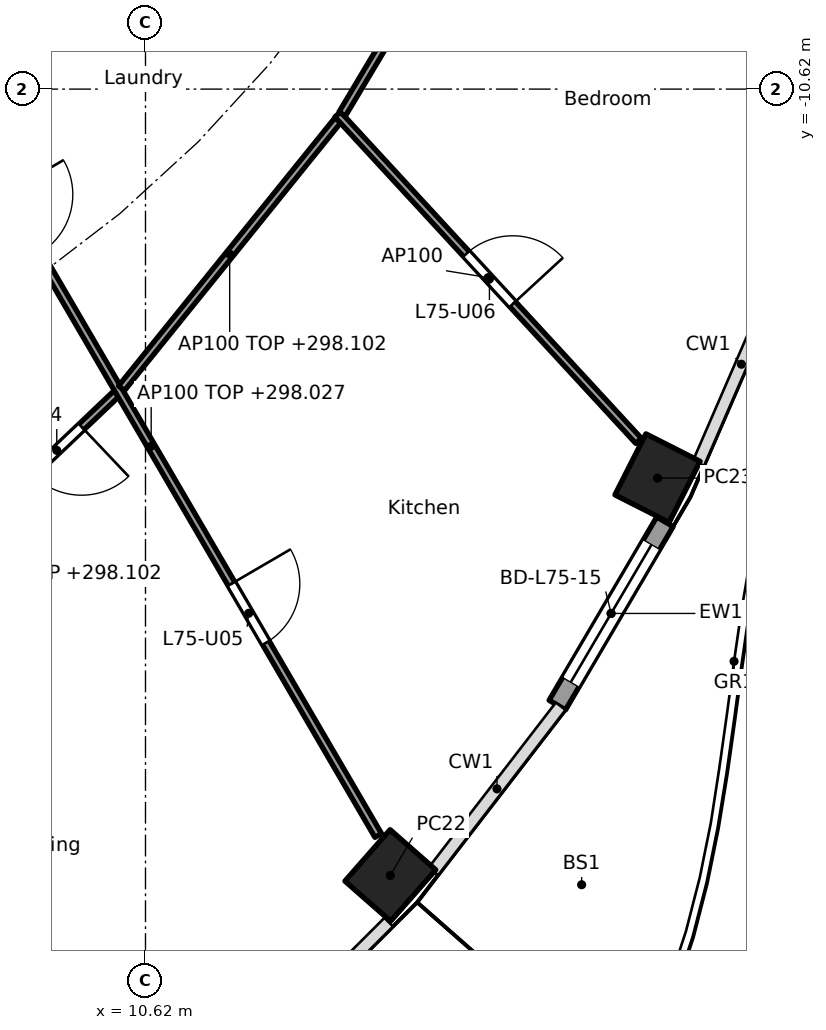
"""IFC4 building model, lengths in metres.
Left out: names, types, materials, properties, quantities, classifications, styles, units other than length and angle.
Written with IfcOpenShell. Run it as: python <this file> out.ifc"""

import sys

from ifc_helpers import new_model, si_unit, direction, frame, frame_2d, origin, origin_2d, place, context, subcontext, project, spatial, rectangle, hollow_rectangle, extrude, element, fill, save


model = new_model("IFC4")
c1 = context("Model", 3, precision=1e-05, world=origin(), true_north=direction((0.0, 1.0)))
c2 = subcontext(c1, "Body", "Model", "MODEL_VIEW")
j1 = project(units=[si_unit("LENGTHUNIT", "METRE"), si_unit("PLANEANGLEUNIT", "RADIAN")], contexts=[c1])
p1 = place(None, origin())
s1 = spatial("IfcSite", under=j1, at=p1, CompositionType="ELEMENT")
p2 = place(p1, origin())
s2 = spatial("IfcBuilding", under=s1, at=p2, CompositionType="ELEMENT")
p3 = place(p2, frame((0.0, 0.0, 295.5)))
s3 = spatial("IfcBuildingStorey", under=s2, at=p3, CompositionType="ELEMENT", Elevation=295.5)
for number, where, z_axis, x_axis in (
    (1, (13.841, -20.965, 0.0), (0.0, 0.0, 1.0), (0.66, 0.751, 0.0)),
    (2, (17.356, -15.738, 0.0), (0.0, 0.0, 1.0), (0.452, 0.892, 0.0)),
):
    element("IfcColumn", number, at=place(p3, frame(where, z_axis=z_axis, x_axis=x_axis)), inside=s3, PredefinedType="COLUMN", context=c2, shape_type="SweptSolid", body=[
        extrude(hollow_rectangle(XDim=0.9, YDim=0.8, WallThickness=0.028, at=origin_2d()), origin(), (0.0, 0.0, 1.0), 3.7),
    ])
p4 = place(p3, frame((17.454, -16.312, 0.0), z_axis=(0.0, 0.0, 1.0), x_axis=(-0.506371364425, -0.862315511452, 0.0)))
e3 = element("IfcWall", 3, at=p4, inside=s3, PredefinedType="SOLIDWALL", context=c2, shape_type="SweptSolid", body=[
    extrude(rectangle(XDim=2.796, YDim=0.25, at=frame_2d((1.398, 0.0))), origin(), (0.0, 0.0, 1.0), 3.28),
])
p5 = place(p4, frame((0.348, 0.0, 0.0)))
e4 = element("IfcOpeningElement", 4, at=p5, cuts=e3, PredefinedType="OPENING", context=c2, shape_type="SweptSolid", body=[
    extrude(rectangle(XDim=2.1, YDim=2.4, at=frame_2d((1.05, 1.2))), frame((0.0, 0.135, 0.0), z_axis=(0.0, -1.0, 0.0), x_axis=(1.0, 0.0, 0.0)), (0.0, 0.0, 1.0), 0.27),
])
p6 = place(p3, frame((4.613, -9.988, 0.0), z_axis=(0.0, 0.0, 1.0), x_axis=(0.707106781187, 0.707106781187, 0.0)))
e5 = element("IfcWall", 5, at=p6, inside=s3, PredefinedType="SHEAR", context=c2, shape_type="SweptSolid", body=[
    extrude(rectangle(XDim=7.602, YDim=0.6, at=frame_2d((3.801, 0.0))), origin(), (0.0, 0.0, 1.0), 3.28),
])
p7 = place(p6, frame((3.201, 0.0, 0.0)))
e6 = element("IfcOpeningElement", 6, at=p7, cuts=e5, PredefinedType="OPENING", context=c2, shape_type="SweptSolid", body=[
    extrude(rectangle(XDim=1.2, YDim=2.1, at=frame_2d((0.6, 1.05))), frame((0.0, 0.31, 0.0), z_axis=(0.0, -1.0, 0.0), x_axis=(1.0, 0.0, 0.0)), (0.0, 0.0, 1.0), 0.62),
])
p8 = place(p3, frame((5.275, -12.494, 0.0), z_axis=(0.0, 0.0, 1.0), x_axis=(0.707106781187, 0.707106781187, 0.0)))
e7 = element("IfcWall", 7, at=p8, inside=s3, PredefinedType="PARTITIONING", context=c2, shape_type="SweptSolid", body=[
    extrude(rectangle(XDim=10.409, YDim=0.2, at=frame_2d((5.205, 0.0))), origin(), (0.0, 0.0, 1.0), 3.28),
])
p9 = place(p8, frame((1.185, 0.0, 0.0)))
e8 = element("IfcOpeningElement", 8, at=p9, cuts=e7, PredefinedType="OPENING", context=c2, shape_type="SweptSolid", body=[
    extrude(rectangle(XDim=1.0, YDim=2.1, at=frame_2d((0.5, 1.05))), frame((0.0, 0.11, 0.0), z_axis=(0.0, -1.0, 0.0), x_axis=(1.0, 0.0, 0.0)), (0.0, 0.0, 1.0), 0.22),
])
p10 = place(p3, frame((7.004, -17.695, 0.0), z_axis=(0.0, 0.0, 1.0), x_axis=(0.725438442765, 0.68828705186, 0.0)))
e9 = element("IfcWall", 9, at=p10, inside=s3, PredefinedType="PARTITIONING", context=c2, shape_type="SweptSolid", body=[
    extrude(rectangle(XDim=4.456, YDim=0.1, at=frame_2d((2.228, 0.0))), origin(), (0.0, 0.0, 1.0), 2.602),
])
p11 = place(p10, frame((2.925, 0.0, 0.0)))
e10 = element("IfcOpeningElement", 10, at=p11, cuts=e9, PredefinedType="OPENING", context=c2, shape_type="SweptSolid", body=[
    extrude(rectangle(XDim=0.9, YDim=2.1, at=frame_2d((0.45, 1.05))), frame((0.0, 0.06, 0.0), z_axis=(0.0, -1.0, 0.0), x_axis=(1.0, 0.0, 0.0)), (0.0, 0.0, 1.0), 0.12),
])
p12 = place(p3, frame((7.708, -10.198, 0.0), z_axis=(0.0, 0.0, 1.0), x_axis=(0.503839015963, -0.863797572347, 0.0)))
e11 = element("IfcWall", 11, at=p12, inside=s3, PredefinedType="PARTITIONING", context=c2, shape_type="SweptSolid", body=[
    extrude(rectangle(XDim=11.856, YDim=0.1, at=frame_2d((5.928, 0.0))), origin(), (0.0, 0.0, 1.0), 2.527),
])
p13 = place(p12, frame((2.095, 0.0, 0.0)))
e12 = element("IfcOpeningElement", 12, at=p13, cuts=e11, PredefinedType="OPENING", context=c2, shape_type="SweptSolid", body=[
    extrude(rectangle(XDim=0.9, YDim=2.1, at=frame_2d((0.45, 1.05))), frame((0.0, 0.06, 0.0), z_axis=(0.0, -1.0, 0.0), x_axis=(1.0, 0.0, 0.0)), (0.0, 0.0, 1.0), 0.12),
])
p14 = place(p12, frame((8.023, 0.0, 0.0)))
e13 = element("IfcOpeningElement", 13, at=p14, cuts=e11, PredefinedType="OPENING", context=c2, shape_type="SweptSolid", body=[
    extrude(rectangle(XDim=0.9, YDim=2.1, at=frame_2d((0.45, 1.05))), frame((0.0, 0.06, 0.0), z_axis=(0.0, -1.0, 0.0), x_axis=(1.0, 0.0, 0.0)), (0.0, 0.0, 1.0), 0.12),
])
p15 = place(p3, frame((10.304, -14.555, 0.0), z_axis=(0.0, 0.0, 1.0), x_axis=(0.628170338674, 0.778075848237, 0.0)))
e14 = element("IfcWall", 14, at=p15, inside=s3, PredefinedType="PARTITIONING", context=c2, shape_type="SweptSolid", body=[
    extrude(rectangle(XDim=4.532, YDim=0.1, at=frame_2d((2.266, 0.0))), origin(), (0.0, 0.0, 1.0), 2.602),
])
p16 = place(p3, frame((13.149, -10.953, 0.0), z_axis=(0.0, 0.0, 1.0), x_axis=(0.677762562884, -0.735280836384, 0.0)))
e15 = element("IfcWall", 15, at=p16, inside=s3, PredefinedType="PARTITIONING", context=c2, shape_type="SweptSolid", body=[
    extrude(rectangle(XDim=5.841, YDim=0.1, at=frame_2d((2.92, 0.0))), origin(), (0.0, 0.0, 1.0), 3.28),
])
p17 = place(p16, frame((2.495, 0.0, 0.0)))
e16 = element("IfcOpeningElement", 16, at=p17, cuts=e15, PredefinedType="OPENING", context=c2, shape_type="SweptSolid", body=[
    extrude(rectangle(XDim=0.9, YDim=2.1, at=frame_2d((0.45, 1.05))), frame((0.0, 0.06, 0.0), z_axis=(0.0, -1.0, 0.0), x_axis=(1.0, 0.0, 0.0)), (0.0, 0.0, 1.0), 0.12),
])
p18 = place(p3, frame((13.208, -10.947, 0.0), z_axis=(0.0, 0.0, 1.0), x_axis=(0.512726452516, 0.858552028063, 0.0)))
e17 = element("IfcWall", 17, at=p18, inside=s3, PredefinedType="PARTITIONING", context=c2, shape_type="SweptSolid", body=[
    extrude(rectangle(XDim=4.772, YDim=0.1, at=frame_2d((2.386, 0.0))), origin(), (0.0, 0.0, 1.0), 2.602),
])
p19 = place(p5, origin())
e18 = element("IfcDoor", 18, at=p19, inside=s3, OperationType="SLIDING_TO_LEFT", PredefinedType="DOOR", context=c2, shape_type="SweptSolid", body=[
    extrude(rectangle(XDim=2.1, YDim=2.4, at=frame_2d((1.05, 1.2))), frame((0.0, 0.025, 0.0), z_axis=(0.0, -1.0, 0.0), x_axis=(1.0, 0.0, 0.0)), (0.0, 0.0, 1.0), 0.05),
])
fill(e4, e18)
p20 = place(p11, frame((0.9, 0.0, 0.0), x_axis=(-1.0, 0.0, 0.0)))
e19 = element("IfcDoor", 19, at=p20, inside=s3, OperationType="SINGLE_SWING_LEFT", PredefinedType="DOOR", context=c2, shape_type="SweptSolid", body=[
    extrude(rectangle(XDim=0.9, YDim=2.1, at=frame_2d((0.45, 1.05))), frame((0.0, 0.025, 0.0), z_axis=(0.0, -1.0, 0.0), x_axis=(1.0, 0.0, 0.0)), (0.0, 0.0, 1.0), 0.05),
])
fill(e10, e19)
p21 = place(p14, origin())
e20 = element("IfcDoor", 20, at=p21, inside=s3, OperationType="SINGLE_SWING_LEFT", PredefinedType="DOOR", context=c2, shape_type="SweptSolid", body=[
    extrude(rectangle(XDim=0.9, YDim=2.1, at=frame_2d((0.45, 1.05))), frame((0.0, 0.025, 0.0), z_axis=(0.0, -1.0, 0.0), x_axis=(1.0, 0.0, 0.0)), (0.0, 0.0, 1.0), 0.05),
])
fill(e13, e20)
p22 = place(p17, origin())
e21 = element("IfcDoor", 21, at=p22, inside=s3, OperationType="SINGLE_SWING_RIGHT", PredefinedType="DOOR", context=c2, shape_type="SweptSolid", body=[
    extrude(rectangle(XDim=0.9, YDim=2.1, at=frame_2d((0.45, 1.05))), frame((0.0, 0.025, 0.0), z_axis=(0.0, -1.0, 0.0), x_axis=(1.0, 0.0, 0.0)), (0.0, 0.0, 1.0), 0.05),
])
fill(e16, e21)
save(model, sys.argv[1])
